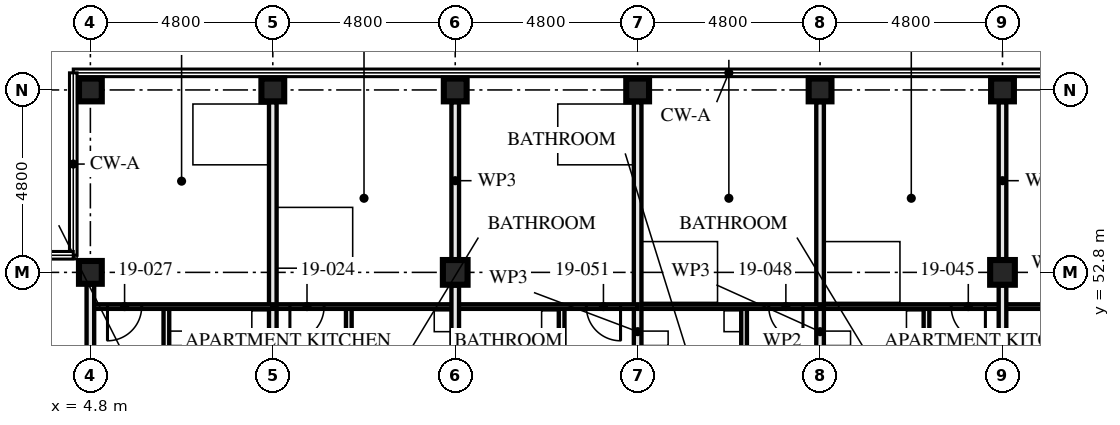
"""IFC4 building model, lengths in metres.
Left out: names, types, materials, properties, quantities, classifications, styles, units other than length and angle.
Written with IfcOpenShell. Run it as: python <this file> out.ifc"""

import sys

from ifc_helpers import new_model, si_unit, direction, frame, frame_2d, origin, origin_2d, place, context, subcontext, project, spatial, rectangle, hollow_rectangle, extrude, element, fill, save


model = new_model("IFC4")
c1 = context("Model", 3, precision=1e-05, world=origin(), true_north=direction((0.0, 1.0)))
c2 = subcontext(c1, "Body", "Model", "MODEL_VIEW")
j1 = project(units=[si_unit("LENGTHUNIT", "METRE"), si_unit("PLANEANGLEUNIT", "RADIAN")], contexts=[c1])
p1 = place(None, origin())
s1 = spatial("IfcSite", under=j1, at=p1, CompositionType="ELEMENT")
p2 = place(p1, origin())
s2 = spatial("IfcBuilding", under=s1, at=p2, CompositionType="ELEMENT")
p3 = place(p2, frame((0.0, 0.0, 72.5)))
s3 = spatial("IfcBuildingStorey", under=s2, at=p3, CompositionType="ELEMENT", Elevation=72.5)
for number, where, z_axis, x_axis in (
    (1, (4.8, 52.8, 0.0), (0.0, 0.0, 1.0), (0.0, 1.0, 0.0)),
    (2, (4.8, 57.6, 0.0), (0.0, 0.0, 1.0), (0.0, 1.0, 0.0)),
    (3, (9.6, 57.6, 0.0), (0.0, 0.0, 1.0), (0.0, 1.0, 0.0)),
):
    element("IfcColumn", number, at=place(p3, frame(where, z_axis=z_axis, x_axis=x_axis)), inside=s3, PredefinedType="COLUMN", context=c2, shape_type="SweptSolid", body=[
        extrude(hollow_rectangle(XDim=0.6, YDim=0.6, WallThickness=0.08, at=origin_2d()), origin(), (0.0, 0.0, 1.0), 3.5),
    ])
p4 = place(p3, frame((14.4, 52.8, 0.0), z_axis=(0.0, 0.0, 1.0), x_axis=(1.0, 0.0, 0.0)))
e4 = element("IfcColumn", 4, at=p4, inside=s3, PredefinedType="COLUMN", context=c2, shape_type="SweptSolid", body=[
    extrude(hollow_rectangle(XDim=0.65, YDim=0.65, WallThickness=0.05, at=origin_2d()), origin(), (0.0, 0.0, 1.0), 3.5),
])
for number, where, z_axis, x_axis in (
    (5, (14.4, 57.6, 0.0), (0.0, 0.0, 1.0), (0.0, 1.0, 0.0)),
    (6, (19.2, 57.6, 0.0), (0.0, 0.0, 1.0), (0.0, 1.0, 0.0)),
    (7, (24.0, 57.6, 0.0), (0.0, 0.0, 1.0), (0.0, 1.0, 0.0)),
):
    element("IfcColumn", number, at=place(p3, frame(where, z_axis=z_axis, x_axis=x_axis)), inside=s3, PredefinedType="COLUMN", context=c2, shape_type="SweptSolid", body=[
        extrude(hollow_rectangle(XDim=0.6, YDim=0.6, WallThickness=0.08, at=origin_2d()), origin(), (0.0, 0.0, 1.0), 3.5),
    ])
p5 = place(p3, frame((28.8, 52.8, 0.0), z_axis=(0.0, 0.0, 1.0), x_axis=(1.0, 0.0, 0.0)))
e8 = element("IfcColumn", 8, at=p5, inside=s3, PredefinedType="COLUMN", context=c2, shape_type="SweptSolid", body=[
    extrude(hollow_rectangle(XDim=0.65, YDim=0.65, WallThickness=0.05, at=origin_2d()), origin(), (0.0, 0.0, 1.0), 3.5),
])
p6 = place(p3, frame((28.8, 57.6, 0.0), z_axis=(0.0, 0.0, 1.0), x_axis=(0.0, 1.0, 0.0)))
e9 = element("IfcColumn", 9, at=p6, inside=s3, PredefinedType="COLUMN", context=c2, shape_type="SweptSolid", body=[
    extrude(hollow_rectangle(XDim=0.6, YDim=0.6, WallThickness=0.08, at=origin_2d()), origin(), (0.0, 0.0, 1.0), 3.5),
])
p7 = place(p3, frame((11.6, 51.9, 0.0), z_axis=(0.0, 0.0, 1.0), x_axis=(0.0, -1.0, 0.0)))
e10 = element("IfcWall", 10, at=p7, inside=s3, PredefinedType="PARTITIONING", context=c2, shape_type="SweptSolid", body=[
    extrude(rectangle(XDim=3.0, YDim=0.15, at=frame_2d((1.5, 0.0))), origin(), (0.0, 0.0, 1.0), 3.33),
])
p8 = place(p3, frame((14.4, 51.9, 0.0), z_axis=(0.0, 0.0, 1.0), x_axis=(-1.0, 0.0, 0.0)))
e11 = element("IfcWall", 11, at=p8, inside=s3, PredefinedType="PARTITIONING", context=c2, shape_type="SweptSolid", body=[
    extrude(rectangle(XDim=4.8, YDim=0.12, at=frame_2d((2.4, 0.0))), origin(), (0.0, 0.0, 1.0), 3.33),
])
p9 = place(p8, frame((3.45, 0.0, 0.0)))
e12 = element("IfcOpeningElement", 12, at=p9, cuts=e11, PredefinedType="OPENING", context=c2, shape_type="SweptSolid", body=[
    extrude(rectangle(XDim=0.9, YDim=2.1, at=frame_2d((0.45, 1.05))), frame((0.0, 0.071, 0.0), z_axis=(0.0, -1.0, 0.0), x_axis=(1.0, 0.0, 0.0)), (0.0, 0.0, 1.0), 0.141),
])
p10 = place(p3, frame((9.6, 57.28, 0.0), z_axis=(0.0, 0.0, 1.0), x_axis=(0.0, -1.0, 0.0)))
e13 = element("IfcWall", 13, at=p10, inside=s3, PredefinedType="PARTITIONING", context=c2, shape_type="SweptSolid", body=[
    extrude(rectangle(XDim=12.08, YDim=0.2, at=frame_2d((6.04, 0.0))), origin(), (0.0, 0.0, 1.0), 2.55),
])
p11 = place(p3, frame((6.8, 51.9, 0.0), z_axis=(0.0, 0.0, 1.0), x_axis=(0.0, -1.0, 0.0)))
e14 = element("IfcWall", 14, at=p11, inside=s3, PredefinedType="PARTITIONING", context=c2, shape_type="SweptSolid", body=[
    extrude(rectangle(XDim=3.0, YDim=0.15, at=frame_2d((1.5, 0.0))), origin(), (0.0, 0.0, 1.0), 3.33),
])
p12 = place(p3, frame((9.6, 51.9, 0.0), z_axis=(0.0, 0.0, 1.0), x_axis=(-1.0, 0.0, 0.0)))
e15 = element("IfcWall", 15, at=p12, inside=s3, PredefinedType="PARTITIONING", context=c2, shape_type="SweptSolid", body=[
    extrude(rectangle(XDim=4.8, YDim=0.12, at=frame_2d((2.4, 0.0))), origin(), (0.0, 0.0, 1.0), 3.33),
])
p13 = place(p12, frame((3.45, 0.0, 0.0)))
e16 = element("IfcOpeningElement", 16, at=p13, cuts=e15, PredefinedType="OPENING", context=c2, shape_type="SweptSolid", body=[
    extrude(rectangle(XDim=0.9, YDim=2.1, at=frame_2d((0.45, 1.05))), frame((0.0, 0.071, 0.0), z_axis=(0.0, -1.0, 0.0), x_axis=(1.0, 0.0, 0.0)), (0.0, 0.0, 1.0), 0.141),
])
p14 = place(p3, frame((4.8, 52.48, 0.0), z_axis=(0.0, 0.0, 1.0), x_axis=(0.0, -1.0, 0.0)))
e17 = element("IfcWall", 17, at=p14, inside=s3, PredefinedType="PARTITIONING", context=c2, shape_type="SweptSolid", body=[
    extrude(rectangle(XDim=7.28, YDim=0.2, at=frame_2d((3.64, 0.0))), origin(), (0.0, 0.0, 1.0), 2.55),
])
p15 = place(p3, frame((26.8, 51.9, 0.0), z_axis=(0.0, 0.0, 1.0), x_axis=(0.0, -1.0, 0.0)))
e18 = element("IfcWall", 18, at=p15, inside=s3, PredefinedType="PARTITIONING", context=c2, shape_type="SweptSolid", body=[
    extrude(rectangle(XDim=3.0, YDim=0.15, at=frame_2d((1.5, 0.0))), origin(), (0.0, 0.0, 1.0), 3.33),
])
p16 = place(p3, frame((28.8, 51.9, 0.0), z_axis=(0.0, 0.0, 1.0), x_axis=(-1.0, 0.0, 0.0)))
e19 = element("IfcWall", 19, at=p16, inside=s3, PredefinedType="PARTITIONING", context=c2, shape_type="SweptSolid", body=[
    extrude(rectangle(XDim=4.8, YDim=0.12, at=frame_2d((2.4, 0.0))), origin(), (0.0, 0.0, 1.0), 3.33),
])
p17 = place(p16, frame((0.45, 0.0, 0.0)))
e20 = element("IfcOpeningElement", 20, at=p17, cuts=e19, PredefinedType="OPENING", context=c2, shape_type="SweptSolid", body=[
    extrude(rectangle(XDim=0.9, YDim=2.1, at=frame_2d((0.45, 1.05))), frame((0.0, 0.071, 0.0), z_axis=(0.0, -1.0, 0.0), x_axis=(1.0, 0.0, 0.0)), (0.0, 0.0, 1.0), 0.141),
])
p18 = place(p3, frame((24.0, 57.28, 0.0), z_axis=(0.0, 0.0, 1.0), x_axis=(0.0, -1.0, 0.0)))
e21 = element("IfcWall", 21, at=p18, inside=s3, PredefinedType="PARTITIONING", context=c2, shape_type="SweptSolid", body=[
    extrude(rectangle(XDim=12.08, YDim=0.2, at=frame_2d((6.04, 0.0))), origin(), (0.0, 0.0, 1.0), 2.55),
])
p19 = place(p3, frame((22.0, 51.9, 0.0), z_axis=(0.0, 0.0, 1.0), x_axis=(0.0, -1.0, 0.0)))
e22 = element("IfcWall", 22, at=p19, inside=s3, PredefinedType="PARTITIONING", context=c2, shape_type="SweptSolid", body=[
    extrude(rectangle(XDim=3.0, YDim=0.15, at=frame_2d((1.5, 0.0))), origin(), (0.0, 0.0, 1.0), 3.33),
])
p20 = place(p3, frame((24.0, 51.9, 0.0), z_axis=(0.0, 0.0, 1.0), x_axis=(-1.0, 0.0, 0.0)))
e23 = element("IfcWall", 23, at=p20, inside=s3, PredefinedType="PARTITIONING", context=c2, shape_type="SweptSolid", body=[
    extrude(rectangle(XDim=4.8, YDim=0.12, at=frame_2d((2.4, 0.0))), origin(), (0.0, 0.0, 1.0), 3.33),
])
p21 = place(p20, frame((0.45, 0.0, 0.0)))
e24 = element("IfcOpeningElement", 24, at=p21, cuts=e23, PredefinedType="OPENING", context=c2, shape_type="SweptSolid", body=[
    extrude(rectangle(XDim=0.9, YDim=2.1, at=frame_2d((0.45, 1.05))), frame((0.0, 0.071, 0.0), z_axis=(0.0, -1.0, 0.0), x_axis=(1.0, 0.0, 0.0)), (0.0, 0.0, 1.0), 0.141),
])
p22 = place(p3, frame((19.2, 57.28, 0.0), z_axis=(0.0, 0.0, 1.0), x_axis=(0.0, -1.0, 0.0)))
e25 = element("IfcWall", 25, at=p22, inside=s3, PredefinedType="PARTITIONING", context=c2, shape_type="SweptSolid", body=[
    extrude(rectangle(XDim=12.08, YDim=0.2, at=frame_2d((6.04, 0.0))), origin(), (0.0, 0.0, 1.0), 2.55),
])
p23 = place(p3, frame((17.2, 51.9, 0.0), z_axis=(0.0, 0.0, 1.0), x_axis=(0.0, -1.0, 0.0)))
e26 = element("IfcWall", 26, at=p23, inside=s3, PredefinedType="PARTITIONING", context=c2, shape_type="SweptSolid", body=[
    extrude(rectangle(XDim=3.0, YDim=0.15, at=frame_2d((1.5, 0.0))), origin(), (0.0, 0.0, 1.0), 3.33),
])
p24 = place(p3, frame((19.2, 51.9, 0.0), z_axis=(0.0, 0.0, 1.0), x_axis=(-1.0, 0.0, 0.0)))
e27 = element("IfcWall", 27, at=p24, inside=s3, PredefinedType="PARTITIONING", context=c2, shape_type="SweptSolid", body=[
    extrude(rectangle(XDim=4.8, YDim=0.12, at=frame_2d((2.4, 0.0))), origin(), (0.0, 0.0, 1.0), 3.33),
])
p25 = place(p24, frame((0.45, 0.0, 0.0)))
e28 = element("IfcOpeningElement", 28, at=p25, cuts=e27, PredefinedType="OPENING", context=c2, shape_type="SweptSolid", body=[
    extrude(rectangle(XDim=0.9, YDim=2.1, at=frame_2d((0.45, 1.05))), frame((0.0, 0.071, 0.0), z_axis=(0.0, -1.0, 0.0), x_axis=(1.0, 0.0, 0.0)), (0.0, 0.0, 1.0), 0.141),
])
p26 = place(p3, frame((33.6, 51.9, 0.0), z_axis=(0.0, 0.0, 1.0), x_axis=(-1.0, 0.0, 0.0)))
e29 = element("IfcWall", 29, at=p26, inside=s3, PredefinedType="PARTITIONING", context=c2, shape_type="SweptSolid", body=[
    extrude(rectangle(XDim=4.8, YDim=0.12, at=frame_2d((2.4, 0.0))), origin(), (0.0, 0.0, 1.0), 3.33),
])
p27 = place(p26, frame((0.45, 0.0, 0.0)))
e30 = element("IfcOpeningElement", 30, at=p27, cuts=e29, PredefinedType="OPENING", context=c2, shape_type="SweptSolid", body=[
    extrude(rectangle(XDim=0.9, YDim=2.1, at=frame_2d((0.45, 1.05))), frame((0.0, 0.071, 0.0), z_axis=(0.0, -1.0, 0.0), x_axis=(1.0, 0.0, 0.0)), (0.0, 0.0, 1.0), 0.141),
])
p28 = place(p3, frame((14.4, 48.345, 0.0), z_axis=(0.0, 0.0, 1.0), x_axis=(0.0, 1.0, 0.0)))
e31 = element("IfcWall", 31, at=p28, inside=s3, PredefinedType="PARTITIONING", context=c2, shape_type="SweptSolid", body=[
    extrude(rectangle(XDim=4.11, YDim=0.2, at=frame_2d((2.055, 0.0))), origin(), (0.0, 0.0, 1.0), 2.32),
])
p29 = place(p3, frame((14.4, 53.145, 0.0), z_axis=(0.0, 0.0, 1.0), x_axis=(0.0, 1.0, 0.0)))
e32 = element("IfcWall", 32, at=p29, inside=s3, PredefinedType="PARTITIONING", context=c2, shape_type="SweptSolid", body=[
    extrude(rectangle(XDim=4.135, YDim=0.2, at=frame_2d((2.067, 0.0))), origin(), (0.0, 0.0, 1.0), 2.32),
])
p30 = place(p3, frame((28.8, 48.345, 0.0), z_axis=(0.0, 0.0, 1.0), x_axis=(0.0, 1.0, 0.0)))
e33 = element("IfcWall", 33, at=p30, inside=s3, PredefinedType="PARTITIONING", context=c2, shape_type="SweptSolid", body=[
    extrude(rectangle(XDim=4.11, YDim=0.2, at=frame_2d((2.055, 0.0))), origin(), (0.0, 0.0, 1.0), 2.32),
])
p31 = place(p3, frame((28.8, 53.145, 0.0), z_axis=(0.0, 0.0, 1.0), x_axis=(0.0, 1.0, 0.0)))
e34 = element("IfcWall", 34, at=p31, inside=s3, PredefinedType="PARTITIONING", context=c2, shape_type="SweptSolid", body=[
    extrude(rectangle(XDim=4.135, YDim=0.2, at=frame_2d((2.067, 0.0))), origin(), (0.0, 0.0, 1.0), 2.32),
])
p32 = place(p9, origin())
e35 = element("IfcDoor", 35, at=p32, inside=s3, OperationType="SINGLE_SWING_LEFT", PredefinedType="DOOR", context=c2, shape_type="SweptSolid", body=[
    extrude(rectangle(XDim=0.9, YDim=2.1, at=frame_2d((0.45, 1.05))), frame((0.0, 0.022, 0.0), z_axis=(0.0, -1.0, 0.0), x_axis=(1.0, 0.0, 0.0)), (0.0, 0.0, 1.0), 0.044),
])
fill(e12, e35)
p33 = place(p13, origin())
e36 = element("IfcDoor", 36, at=p33, inside=s3, OperationType="SINGLE_SWING_LEFT", PredefinedType="DOOR", context=c2, shape_type="SweptSolid", body=[
    extrude(rectangle(XDim=0.9, YDim=2.1, at=frame_2d((0.45, 1.05))), frame((0.0, 0.022, 0.0), z_axis=(0.0, -1.0, 0.0), x_axis=(1.0, 0.0, 0.0)), (0.0, 0.0, 1.0), 0.044),
])
fill(e16, e36)
p34 = place(p17, origin())
e37 = element("IfcDoor", 37, at=p34, inside=s3, OperationType="SINGLE_SWING_RIGHT", PredefinedType="DOOR", context=c2, shape_type="SweptSolid", body=[
    extrude(rectangle(XDim=0.9, YDim=2.1, at=frame_2d((0.45, 1.05))), frame((0.0, 0.022, 0.0), z_axis=(0.0, -1.0, 0.0), x_axis=(1.0, 0.0, 0.0)), (0.0, 0.0, 1.0), 0.044),
])
fill(e20, e37)
p35 = place(p21, origin())
e38 = element("IfcDoor", 38, at=p35, inside=s3, OperationType="SINGLE_SWING_RIGHT", PredefinedType="DOOR", context=c2, shape_type="SweptSolid", body=[
    extrude(rectangle(XDim=0.9, YDim=2.1, at=frame_2d((0.45, 1.05))), frame((0.0, 0.022, 0.0), z_axis=(0.0, -1.0, 0.0), x_axis=(1.0, 0.0, 0.0)), (0.0, 0.0, 1.0), 0.044),
])
fill(e24, e38)
p36 = place(p25, origin())
e39 = element("IfcDoor", 39, at=p36, inside=s3, OperationType="SINGLE_SWING_RIGHT", PredefinedType="DOOR", context=c2, shape_type="SweptSolid", body=[
    extrude(rectangle(XDim=0.9, YDim=2.1, at=frame_2d((0.45, 1.05))), frame((0.0, 0.022, 0.0), z_axis=(0.0, -1.0, 0.0), x_axis=(1.0, 0.0, 0.0)), (0.0, 0.0, 1.0), 0.044),
])
fill(e28, e39)
save(model, sys.argv[1])
